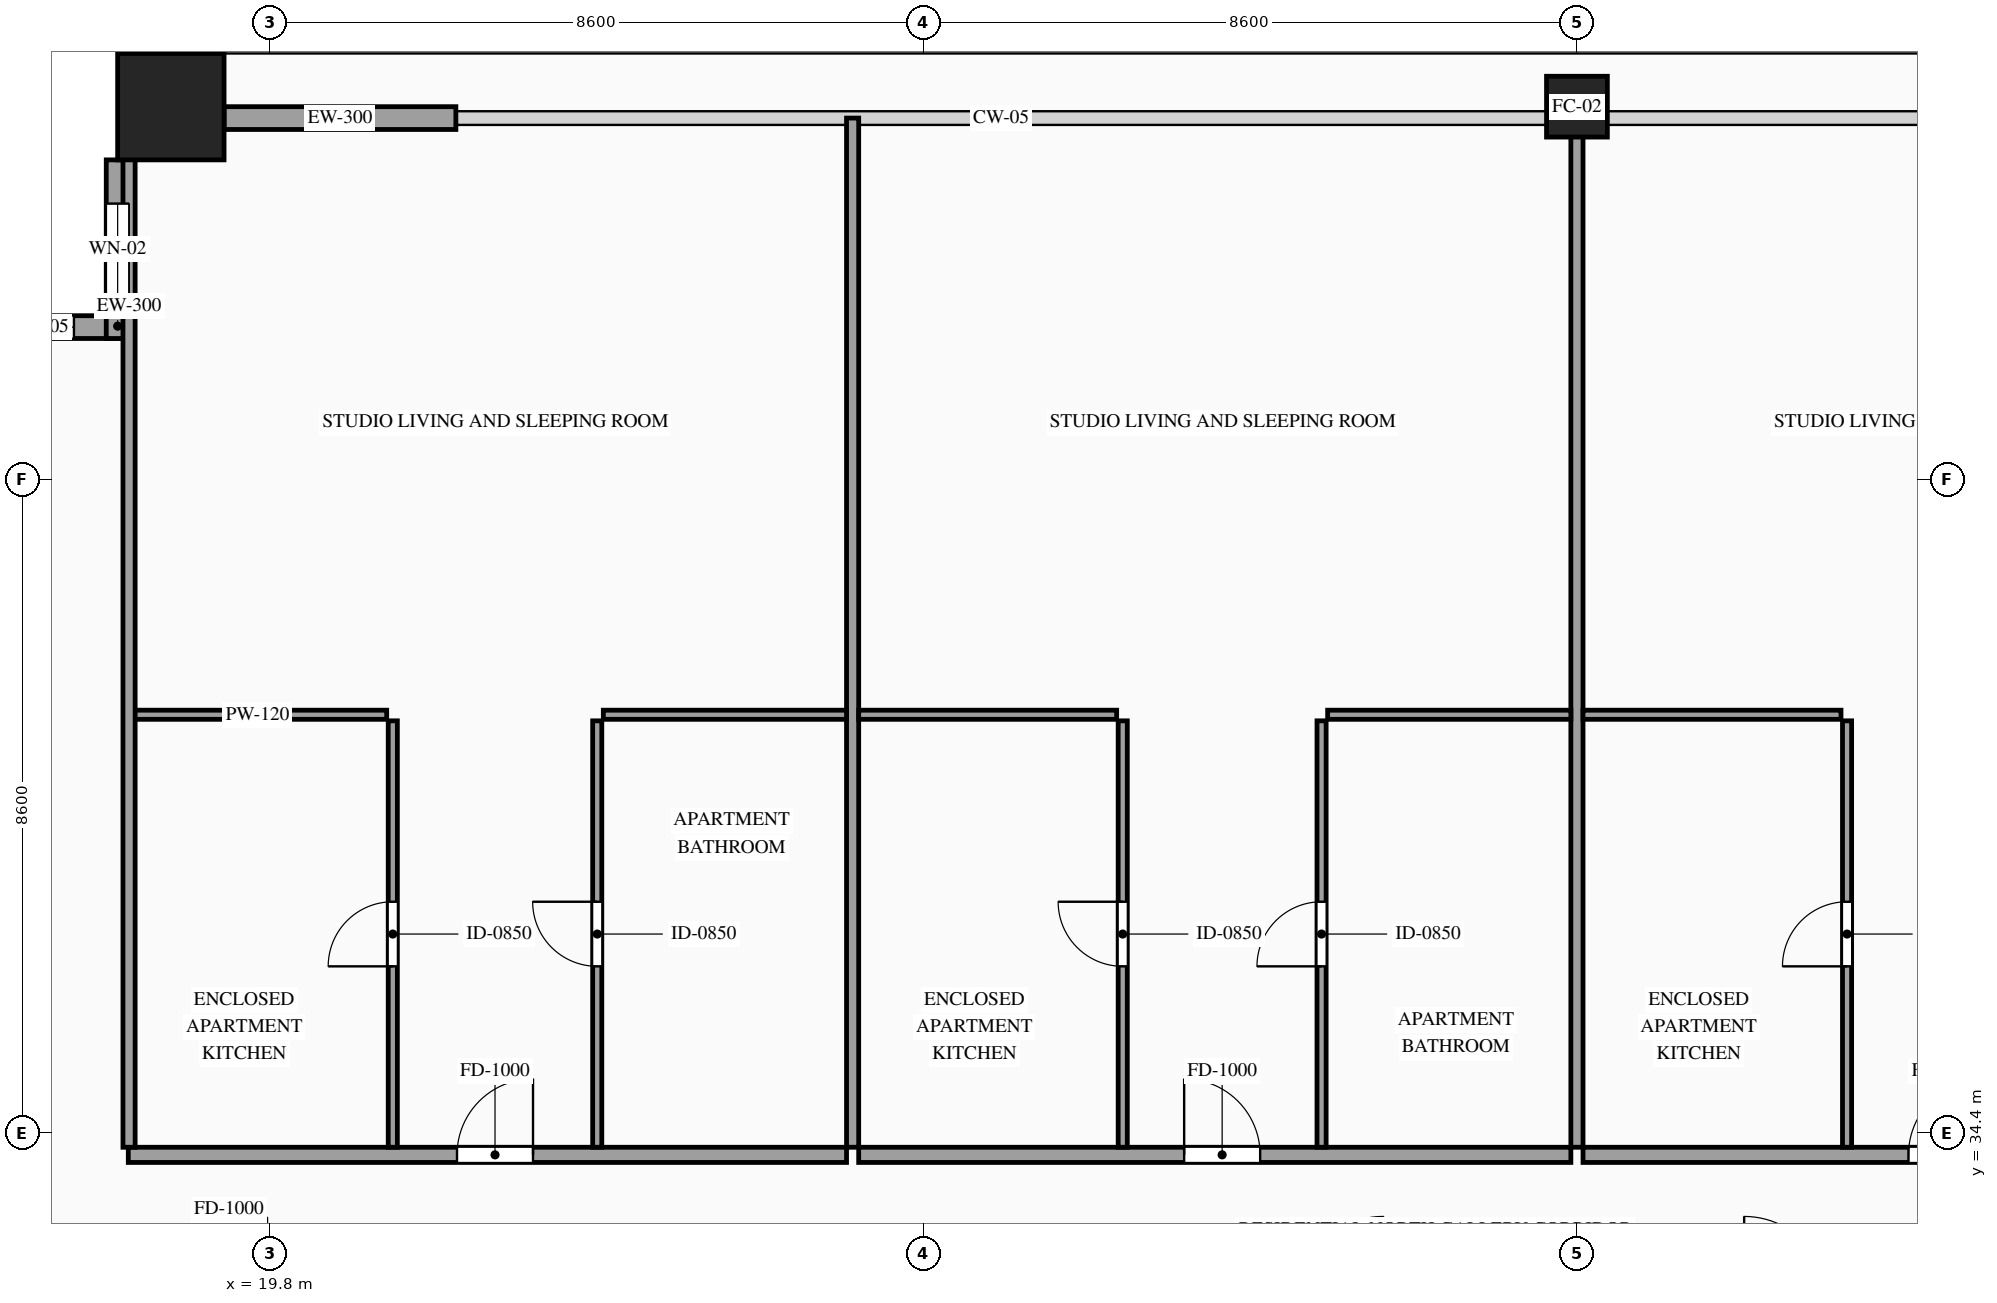
"""IFC4 building model, lengths in metres.
Left out: names, types, materials, properties, quantities, classifications, styles, units other than length and angle.
Written with IfcOpenShell. Run it as: python <this file> out.ifc"""

import sys

from ifc_helpers import new_model, si_unit, direction, frame, frame_2d, origin, origin_2d, place, context, subcontext, project, spatial, rectangle, hollow_rectangle, extrude, source, transform, mapped, element, fill, save


model = new_model("IFC4")
c1 = context("Model", 3, precision=1e-05, world=origin(), true_north=direction((0.0, 1.0)))
c2 = subcontext(c1, "Body", "Model", "MODEL_VIEW")
j1 = project(units=[si_unit("LENGTHUNIT", "METRE"), si_unit("PLANEANGLEUNIT", "RADIAN")], contexts=[c1])
p1 = place(None, origin())
s1 = spatial("IfcSite", under=j1, at=p1, CompositionType="ELEMENT")
p2 = place(p1, origin())
s2 = spatial("IfcBuilding", under=s1, at=p2, CompositionType="ELEMENT")
p3 = place(p2, frame((0.0, 0.0, 188.0)))
s3 = spatial("IfcBuildingStorey", under=s2, at=p3, CompositionType="ELEMENT", Elevation=188.0)
m1 = source(origin(), c2, "Body", "SweptSolid", [
    extrude(hollow_rectangle(XDim=1.4, YDim=1.4, WallThickness=0.06, at=origin_2d()), origin(), (0.0, 0.0, 1.0), 3.5),
])
p4 = place(p3, frame((18.5, 47.9, 0.0), z_axis=(0.0, 0.0, 1.0), x_axis=(1.0, 0.0, 0.0)))
e1 = element("IfcColumn", 1, at=p4, inside=s3, PredefinedType="COLUMN", context=c2, shape_type="MappedRepresentation", body=[
    mapped(m1, transform((0.0, 0.0, 0.0), scale=1.0)),
])
m2 = source(origin(), c2, "Body", "SweptSolid", [
    extrude(hollow_rectangle(XDim=0.8, YDim=0.8, WallThickness=0.036, at=origin_2d()), origin(), (0.0, 0.0, 1.0), 3.5),
])
p5 = place(p3, frame((37.0, 47.9, 0.0), z_axis=(0.0, 0.0, 1.0), x_axis=(1.0, 0.0, 0.0)))
e2 = element("IfcColumn", 2, at=p5, inside=s3, PredefinedType="COLUMN", context=c2, shape_type="MappedRepresentation", body=[
    mapped(m2, transform((0.0, 0.0, 0.0), scale=1.0)),
])
p6 = place(p3, frame((17.95, 45.0, 0.0), z_axis=(0.0, 0.0, 1.0), x_axis=(-1.0, 0.0, 0.0)))
e3 = element("IfcWall", 3, at=p6, inside=s3, PredefinedType="SOLIDWALL", context=c2, shape_type="SweptSolid", body=[
    extrude(rectangle(XDim=2.35, YDim=0.3, at=frame_2d((1.175, 0.0))), origin(), (0.0, 0.0, 1.0), 3.28),
])
p7 = place(p6, frame((0.725, 0.0, 0.85)))
e4 = element("IfcOpeningElement", 4, at=p7, cuts=e3, PredefinedType="OPENING", context=c2, shape_type="SweptSolid", body=[
    extrude(rectangle(XDim=0.9, YDim=1.5, at=frame_2d((0.45, 0.75))), frame((0.0, 0.165, 0.0), z_axis=(0.0, -1.0, 0.0), x_axis=(1.0, 0.0, 0.0)), (0.0, 0.0, 1.0), 0.33),
])
p8 = place(p3, frame((17.8, 47.2, 0.0), z_axis=(0.0, 0.0, 1.0), x_axis=(0.0, -1.0, 0.0)))
e5 = element("IfcWall", 5, at=p8, inside=s3, PredefinedType="SOLIDWALL", context=c2, shape_type="SweptSolid", body=[
    extrude(rectangle(XDim=2.35, YDim=0.3, at=frame_2d((1.175, 0.0))), origin(), (0.0, 0.0, 1.0), 3.28),
])
p9 = place(p8, frame((0.575, 0.0, 0.85)))
e6 = element("IfcOpeningElement", 6, at=p9, cuts=e5, PredefinedType="OPENING", context=c2, shape_type="SweptSolid", body=[
    extrude(rectangle(XDim=1.2, YDim=2.1, at=frame_2d((0.6, 1.05))), frame((0.0, 0.165, 0.0), z_axis=(0.0, -1.0, 0.0), x_axis=(1.0, 0.0, 0.0)), (0.0, 0.0, 1.0), 0.33),
])
m3 = source(origin(), c2, "Body", "SweptSolid", [
    extrude(rectangle(XDim=3.05, YDim=0.3, at=frame_2d((1.525, 0.0))), origin(), (0.0, 0.0, 1.0), 2.835),
])
p10 = place(p3, frame((19.2, 47.75, 0.0), z_axis=(0.0, 0.0, 1.0), x_axis=(1.0, 0.0, 0.0)))
e7 = element("IfcWall", 7, at=p10, inside=s3, PredefinedType="SOLIDWALL", context=c2, shape_type="MappedRepresentation", body=[
    mapped(m3, transform((0.0, 0.0, 0.0), scale=1.0)),
])
p11 = place(p3, frame((17.94, 34.11, 0.0), z_axis=(0.0, 0.0, 1.0), x_axis=(1.0, 0.0, 0.0)))
e8 = element("IfcWall", 8, at=p11, inside=s3, PredefinedType="PARTITIONING", context=c2, shape_type="SweptSolid", body=[
    extrude(rectangle(XDim=9.45, YDim=0.2, at=frame_2d((4.725, 0.0))), origin(), (0.0, 0.0, 1.0), 3.28),
])
p12 = place(p11, frame((4.325, 0.0, 0.0)))
e9 = element("IfcOpeningElement", 9, at=p12, cuts=e8, PredefinedType="OPENING", context=c2, shape_type="SweptSolid", body=[
    extrude(rectangle(XDim=1.0, YDim=2.2, at=frame_2d((0.5, 1.1))), frame((0.0, 0.115, 0.0), z_axis=(0.0, -1.0, 0.0), x_axis=(1.0, 0.0, 0.0)), (0.0, 0.0, 1.0), 0.23),
])
m4 = source(origin(), c2, "Body", "SweptSolid", [
    extrude(rectangle(XDim=13.54, YDim=0.16, at=frame_2d((6.77, 0.0))), origin(), (0.0, 0.0, 1.0), 3.28),
])
p13 = place(p3, frame((27.47, 34.21, 0.0), z_axis=(0.0, 0.0, 1.0), x_axis=(0.0, 1.0, 0.0)))
e10 = element("IfcWall", 10, at=p13, inside=s3, PredefinedType="PARTITIONING", context=c2, shape_type="MappedRepresentation", body=[
    mapped(m4, transform((0.0, 0.0, 0.0), scale=1.0)),
])
m5 = source(origin(), c2, "Body", "SweptSolid", [
    extrude(rectangle(XDim=3.4, YDim=0.12, at=frame_2d((1.7, 0.0))), origin(), (0.0, 0.0, 1.0), 3.28),
])
p14 = place(p3, frame((17.94, 39.9, 0.0), z_axis=(0.0, 0.0, 1.0), x_axis=(1.0, 0.0, 0.0)))
e11 = element("IfcWall", 11, at=p14, inside=s3, PredefinedType="PARTITIONING", context=c2, shape_type="MappedRepresentation", body=[
    mapped(m5, transform((0.0, 0.0, 0.0), scale=1.0)),
])
p15 = place(p3, frame((21.42, 34.21, 0.0), z_axis=(0.0, 0.0, 1.0), x_axis=(0.0, 1.0, 0.0)))
e12 = element("IfcWall", 12, at=p15, inside=s3, PredefinedType="PARTITIONING", context=c2, shape_type="SweptSolid", body=[
    extrude(rectangle(XDim=5.61, YDim=0.12, at=frame_2d((2.805, 0.0))), origin(), (0.0, 0.0, 1.0), 3.28),
])
p16 = place(p15, frame((2.38, 0.0, 0.0)))
e13 = element("IfcOpeningElement", 13, at=p16, cuts=e12, PredefinedType="OPENING", context=c2, shape_type="SweptSolid", body=[
    extrude(rectangle(XDim=0.85, YDim=2.1, at=frame_2d((0.425, 1.05))), frame((0.0, 0.075, 0.0), z_axis=(0.0, -1.0, 0.0), x_axis=(1.0, 0.0, 0.0)), (0.0, 0.0, 1.0), 0.15),
])
m6 = source(origin(), c2, "Body", "SweptSolid", [
    extrude(rectangle(XDim=3.2, YDim=0.12, at=frame_2d((1.6, 0.0))), origin(), (0.0, 0.0, 1.0), 2.875),
])
p17 = place(p3, frame((24.19, 39.9, 0.0), z_axis=(0.0, 0.0, 1.0), x_axis=(1.0, 0.0, 0.0)))
e14 = element("IfcWall", 14, at=p17, inside=s3, PredefinedType="PARTITIONING", context=c2, shape_type="MappedRepresentation", body=[
    mapped(m6, transform((0.0, 0.0, 0.0), scale=1.0)),
])
p18 = place(p3, frame((24.11, 34.21, 0.0), z_axis=(0.0, 0.0, 1.0), x_axis=(0.0, 1.0, 0.0)))
e15 = element("IfcWall", 15, at=p18, inside=s3, PredefinedType="PARTITIONING", context=c2, shape_type="SweptSolid", body=[
    extrude(rectangle(XDim=5.61, YDim=0.12, at=frame_2d((2.805, 0.0))), origin(), (0.0, 0.0, 1.0), 3.28),
])
p19 = place(p18, frame((2.38, 0.0, 0.0)))
e16 = element("IfcOpeningElement", 16, at=p19, cuts=e15, PredefinedType="OPENING", context=c2, shape_type="SweptSolid", body=[
    extrude(rectangle(XDim=0.85, YDim=2.1, at=frame_2d((0.425, 1.05))), frame((0.0, 0.075, 0.0), z_axis=(0.0, -1.0, 0.0), x_axis=(1.0, 0.0, 0.0)), (0.0, 0.0, 1.0), 0.15),
])
p20 = place(p3, frame((27.55, 34.11, 0.0), z_axis=(0.0, 0.0, 1.0), x_axis=(1.0, 0.0, 0.0)))
e17 = element("IfcWall", 17, at=p20, inside=s3, PredefinedType="PARTITIONING", context=c2, shape_type="SweptSolid", body=[
    extrude(rectangle(XDim=9.37, YDim=0.2, at=frame_2d((4.685, 0.0))), origin(), (0.0, 0.0, 1.0), 3.28),
])
p21 = place(p20, frame((4.282, 0.0, 0.0)))
e18 = element("IfcOpeningElement", 18, at=p21, cuts=e17, PredefinedType="OPENING", context=c2, shape_type="SweptSolid", body=[
    extrude(rectangle(XDim=1.0, YDim=2.2, at=frame_2d((0.5, 1.1))), frame((0.0, 0.115, 0.0), z_axis=(0.0, -1.0, 0.0), x_axis=(1.0, 0.0, 0.0)), (0.0, 0.0, 1.0), 0.23),
])
m7 = source(origin(), c2, "Body", "SweptSolid", [
    extrude(rectangle(XDim=13.54, YDim=0.16, at=frame_2d((6.77, 0.0))), origin(), (0.0, 0.0, 1.0), 2.687),
])
p22 = place(p3, frame((37.0, 34.21, 0.0), z_axis=(0.0, 0.0, 1.0), x_axis=(0.0, 1.0, 0.0)))
e19 = element("IfcWall", 19, at=p22, inside=s3, PredefinedType="PARTITIONING", context=c2, shape_type="MappedRepresentation", body=[
    mapped(m7, transform((0.0, 0.0, 0.0), scale=1.0)),
])
m8 = source(origin(), c2, "Body", "SweptSolid", [
    extrude(rectangle(XDim=3.394, YDim=0.12, at=frame_2d((1.697, 0.0))), origin(), (0.0, 0.0, 1.0), 2.875),
])
p23 = place(p3, frame((27.55, 39.9, 0.0), z_axis=(0.0, 0.0, 1.0), x_axis=(1.0, 0.0, 0.0)))
e20 = element("IfcWall", 20, at=p23, inside=s3, PredefinedType="PARTITIONING", context=c2, shape_type="MappedRepresentation", body=[
    mapped(m8, transform((0.0, 0.0, 0.0), scale=1.0)),
])
p24 = place(p3, frame((31.024, 34.21, 0.0), z_axis=(0.0, 0.0, 1.0), x_axis=(0.0, 1.0, 0.0)))
e21 = element("IfcWall", 21, at=p24, inside=s3, PredefinedType="PARTITIONING", context=c2, shape_type="SweptSolid", body=[
    extrude(rectangle(XDim=5.61, YDim=0.12, at=frame_2d((2.805, 0.0))), origin(), (0.0, 0.0, 1.0), 3.28),
])
p25 = place(p24, frame((2.38, 0.0, 0.0)))
e22 = element("IfcOpeningElement", 22, at=p25, cuts=e21, PredefinedType="OPENING", context=c2, shape_type="SweptSolid", body=[
    extrude(rectangle(XDim=0.85, YDim=2.1, at=frame_2d((0.425, 1.05))), frame((0.0, 0.075, 0.0), z_axis=(0.0, -1.0, 0.0), x_axis=(1.0, 0.0, 0.0)), (0.0, 0.0, 1.0), 0.15),
])
p26 = place(p3, frame((33.72, 39.9, 0.0), z_axis=(0.0, 0.0, 1.0), x_axis=(1.0, 0.0, 0.0)))
e23 = element("IfcWall", 23, at=p26, inside=s3, PredefinedType="PARTITIONING", context=c2, shape_type="MappedRepresentation", body=[
    mapped(m6, transform((0.0, 0.0, 0.0), scale=1.0)),
])
p27 = place(p3, frame((33.64, 34.21, 0.0), z_axis=(0.0, 0.0, 1.0), x_axis=(0.0, 1.0, 0.0)))
e24 = element("IfcWall", 24, at=p27, inside=s3, PredefinedType="PARTITIONING", context=c2, shape_type="SweptSolid", body=[
    extrude(rectangle(XDim=5.61, YDim=0.12, at=frame_2d((2.805, 0.0))), origin(), (0.0, 0.0, 1.0), 3.28),
])
p28 = place(p27, frame((2.38, 0.0, 0.0)))
e25 = element("IfcOpeningElement", 25, at=p28, cuts=e24, PredefinedType="OPENING", context=c2, shape_type="SweptSolid", body=[
    extrude(rectangle(XDim=0.85, YDim=2.1, at=frame_2d((0.425, 1.05))), frame((0.0, 0.075, 0.0), z_axis=(0.0, -1.0, 0.0), x_axis=(1.0, 0.0, 0.0)), (0.0, 0.0, 1.0), 0.15),
])
p29 = place(p3, frame((37.08, 34.11, 0.0), z_axis=(0.0, 0.0, 1.0), x_axis=(1.0, 0.0, 0.0)))
e26 = element("IfcWall", 26, at=p29, inside=s3, PredefinedType="PARTITIONING", context=c2, shape_type="SweptSolid", body=[
    extrude(rectangle(XDim=9.37, YDim=0.2, at=frame_2d((4.685, 0.0))), origin(), (0.0, 0.0, 1.0), 3.28),
])
p30 = place(p29, frame((4.282, 0.0, 0.0)))
e27 = element("IfcOpeningElement", 27, at=p30, cuts=e26, PredefinedType="OPENING", context=c2, shape_type="SweptSolid", body=[
    extrude(rectangle(XDim=1.0, YDim=2.2, at=frame_2d((0.5, 1.1))), frame((0.0, 0.115, 0.0), z_axis=(0.0, -1.0, 0.0), x_axis=(1.0, 0.0, 0.0)), (0.0, 0.0, 1.0), 0.23),
])
p31 = place(p3, frame((37.08, 39.9, 0.0), z_axis=(0.0, 0.0, 1.0), x_axis=(1.0, 0.0, 0.0)))
e28 = element("IfcWall", 28, at=p31, inside=s3, PredefinedType="PARTITIONING", context=c2, shape_type="MappedRepresentation", body=[
    mapped(m8, transform((0.0, 0.0, 0.0), scale=1.0)),
])
p32 = place(p3, frame((40.554, 34.21, 0.0), z_axis=(0.0, 0.0, 1.0), x_axis=(0.0, 1.0, 0.0)))
e29 = element("IfcWall", 29, at=p32, inside=s3, PredefinedType="PARTITIONING", context=c2, shape_type="SweptSolid", body=[
    extrude(rectangle(XDim=5.61, YDim=0.12, at=frame_2d((2.805, 0.0))), origin(), (0.0, 0.0, 1.0), 3.28),
])
p33 = place(p32, frame((2.38, 0.0, 0.0)))
e30 = element("IfcOpeningElement", 30, at=p33, cuts=e29, PredefinedType="OPENING", context=c2, shape_type="SweptSolid", body=[
    extrude(rectangle(XDim=0.85, YDim=2.1, at=frame_2d((0.425, 1.05))), frame((0.0, 0.075, 0.0), z_axis=(0.0, -1.0, 0.0), x_axis=(1.0, 0.0, 0.0)), (0.0, 0.0, 1.0), 0.15),
])
m9 = source(origin(), c2, "Body", "SweptSolid", [
    extrude(rectangle(XDim=13.39, YDim=0.16, at=frame_2d((6.695, 0.0))), origin(), (0.0, 0.0, 1.0), 3.28),
])
p34 = place(p3, frame((17.95, 34.21, 0.0), z_axis=(0.0, 0.0, 1.0), x_axis=(0.0, 1.0, 0.0)))
e31 = element("IfcWall", 31, at=p34, inside=s3, PredefinedType="PARTITIONING", context=c2, shape_type="MappedRepresentation", body=[
    mapped(m9, transform((0.0, 0.0, 0.0), scale=1.0)),
])
m10 = source(origin(), c2, "Body", "SweptSolid", [
    extrude(rectangle(XDim=0.9, YDim=1.5, at=frame_2d((0.45, 0.75))), frame((0.0, 0.03, 0.0), z_axis=(0.0, -1.0, 0.0), x_axis=(1.0, 0.0, 0.0)), (0.0, 0.0, 1.0), 0.06),
])
p35 = place(p7, origin())
e32 = element("IfcWindow", 32, at=p35, inside=s3, PartitioningType="SINGLE_PANEL", PredefinedType="WINDOW", context=c2, shape_type="MappedRepresentation", body=[
    mapped(m10, transform((0.0, 0.0, 0.0), scale=1.0)),
])
fill(e4, e32)
m11 = source(origin(), c2, "Body", "SweptSolid", [
    extrude(rectangle(XDim=1.2, YDim=2.1, at=frame_2d((0.6, 1.05))), frame((0.0, 0.03, 0.0), z_axis=(0.0, -1.0, 0.0), x_axis=(1.0, 0.0, 0.0)), (0.0, 0.0, 1.0), 0.06),
])
p36 = place(p9, origin())
e33 = element("IfcWindow", 33, at=p36, inside=s3, PartitioningType="SINGLE_PANEL", PredefinedType="WINDOW", context=c2, shape_type="MappedRepresentation", body=[
    mapped(m11, transform((0.0, 0.0, 0.0), scale=1.0)),
])
fill(e6, e33)
m12 = source(origin(), c2, "Body", "SweptSolid", [
    extrude(rectangle(XDim=1.0, YDim=2.2, at=frame_2d((0.5, 1.1))), frame((0.0, 0.025, 0.0), z_axis=(0.0, -1.0, 0.0), x_axis=(1.0, 0.0, 0.0)), (0.0, 0.0, 1.0), 0.05),
])
p37 = place(p12, origin())
e34 = element("IfcDoor", 34, at=p37, inside=s3, OperationType="SINGLE_SWING_RIGHT", PredefinedType="DOOR", context=c2, shape_type="MappedRepresentation", body=[
    mapped(m12, transform((0.0, 0.0, 0.0), scale=1.0)),
])
fill(e9, e34)
m13 = source(origin(), c2, "Body", "SweptSolid", [
    extrude(rectangle(XDim=0.85, YDim=2.1, at=frame_2d((0.425, 1.05))), frame((0.0, 0.025, 0.0), z_axis=(0.0, -1.0, 0.0), x_axis=(1.0, 0.0, 0.0)), (0.0, 0.0, 1.0), 0.05),
])
p38 = place(p16, origin())
e35 = element("IfcDoor", 35, at=p38, inside=s3, OperationType="SINGLE_SWING_LEFT", PredefinedType="DOOR", context=c2, shape_type="MappedRepresentation", body=[
    mapped(m13, transform((0.0, 0.0, 0.0), scale=1.0)),
])
fill(e13, e35)
p39 = place(p19, origin())
e36 = element("IfcDoor", 36, at=p39, inside=s3, OperationType="SINGLE_SWING_RIGHT", PredefinedType="DOOR", context=c2, shape_type="MappedRepresentation", body=[
    mapped(m13, transform((0.0, 0.0, 0.0), scale=1.0)),
])
fill(e16, e36)
p40 = place(p21, origin())
e37 = element("IfcDoor", 37, at=p40, inside=s3, OperationType="SINGLE_SWING_LEFT", PredefinedType="DOOR", context=c2, shape_type="MappedRepresentation", body=[
    mapped(m12, transform((0.0, 0.0, 0.0), scale=1.0)),
])
fill(e18, e37)
p41 = place(p25, origin())
e38 = element("IfcDoor", 38, at=p41, inside=s3, OperationType="SINGLE_SWING_RIGHT", PredefinedType="DOOR", context=c2, shape_type="MappedRepresentation", body=[
    mapped(m13, transform((0.0, 0.0, 0.0), scale=1.0)),
])
fill(e22, e38)
p42 = place(p28, origin())
e39 = element("IfcDoor", 39, at=p42, inside=s3, OperationType="SINGLE_SWING_LEFT", PredefinedType="DOOR", context=c2, shape_type="MappedRepresentation", body=[
    mapped(m13, transform((0.0, 0.0, 0.0), scale=1.0)),
])
fill(e25, e39)
p43 = place(p30, origin())
e40 = element("IfcDoor", 40, at=p43, inside=s3, OperationType="SINGLE_SWING_RIGHT", PredefinedType="DOOR", context=c2, shape_type="MappedRepresentation", body=[
    mapped(m12, transform((0.0, 0.0, 0.0), scale=1.0)),
])
fill(e27, e40)
p44 = place(p33, origin())
e41 = element("IfcDoor", 41, at=p44, inside=s3, OperationType="SINGLE_SWING_LEFT", PredefinedType="DOOR", context=c2, shape_type="MappedRepresentation", body=[
    mapped(m13, transform((0.0, 0.0, 0.0), scale=1.0)),
])
fill(e30, e41)
save(model, sys.argv[1])
